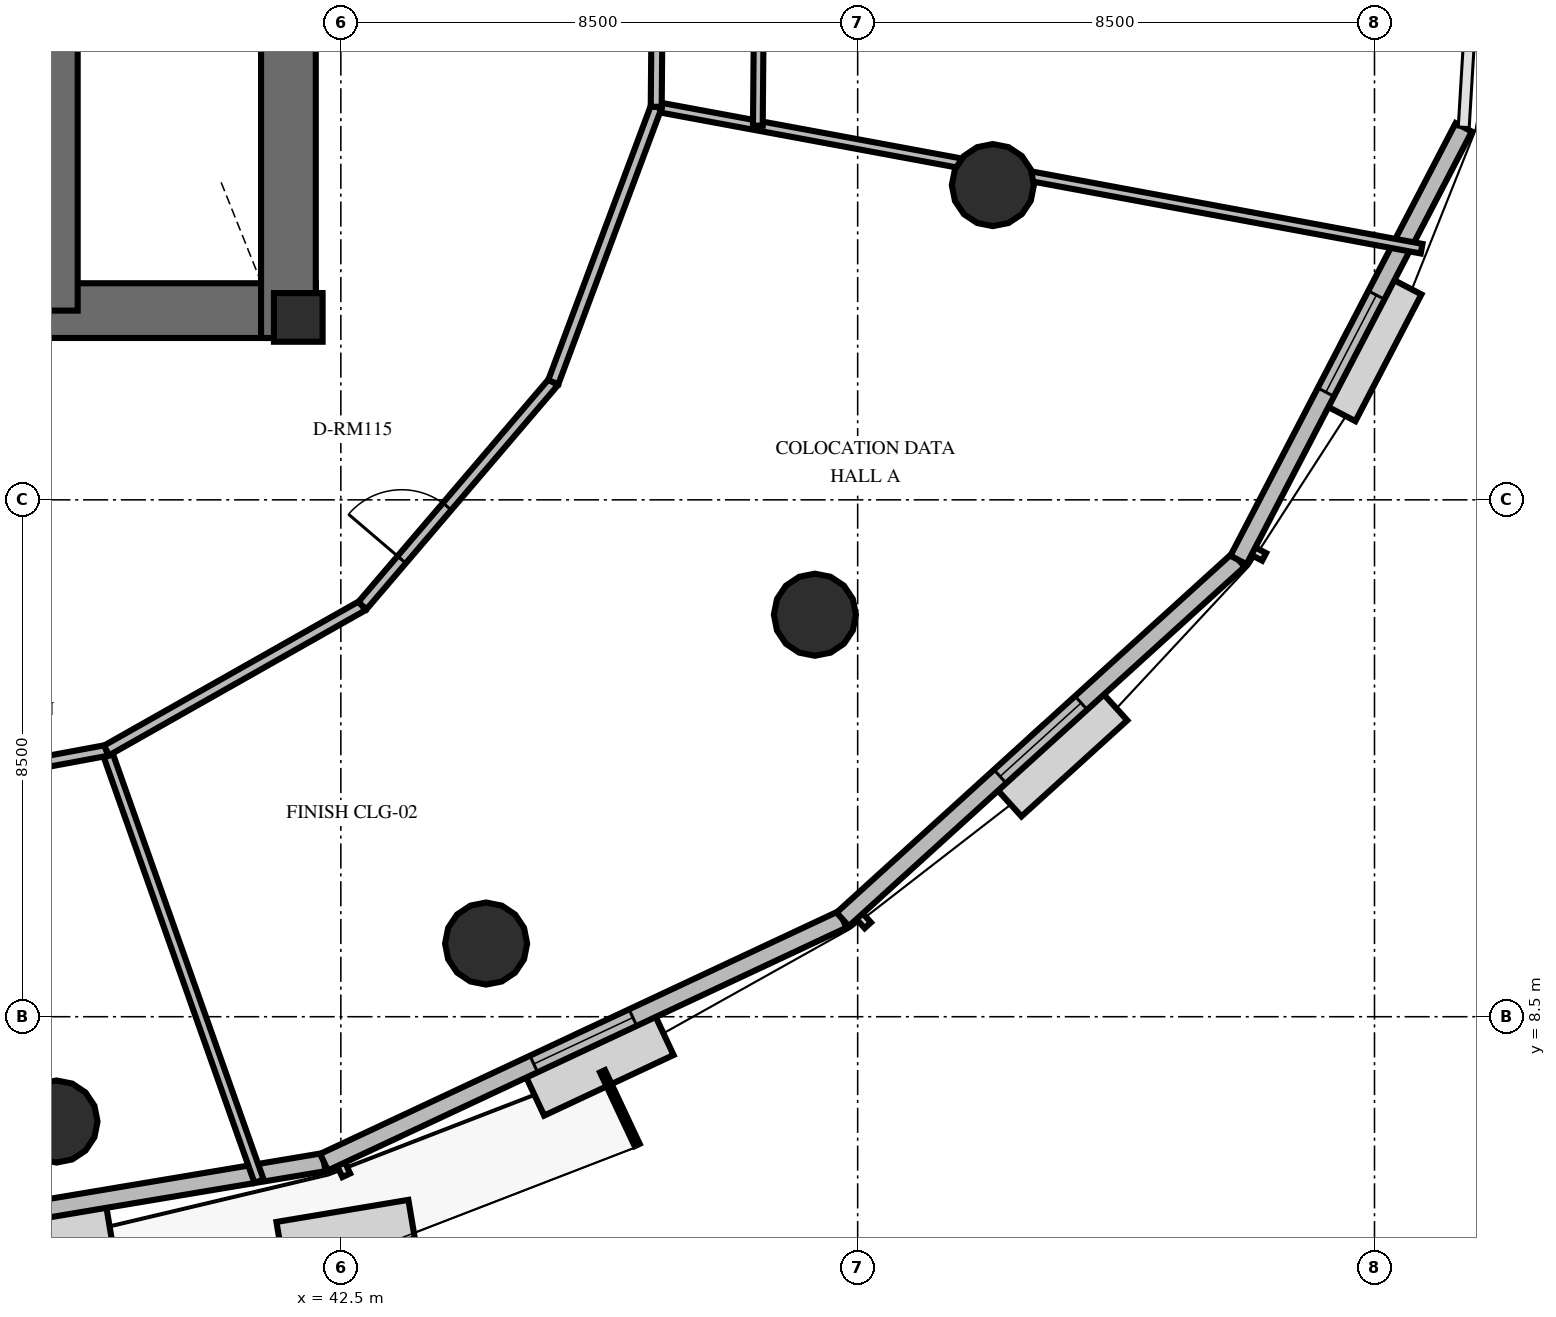
"""IFC4 building model, lengths in metres.
Left out: names, types, materials, properties, quantities, classifications, styles, units other than length and angle.
Written with IfcOpenShell. Run it as: python <this file> out.ifc"""

import sys

from ifc_helpers import new_model, si_unit, direction, frame, frame_2d, origin, origin_2d, place, context, subcontext, project, spatial, rectangle, circle, extrude, element, fill, save


model = new_model("IFC4")
c1 = context("Model", 3, precision=1e-05, world=origin(), true_north=direction((0.0, 1.0)))
c2 = subcontext(c1, "Body", "Model", "MODEL_VIEW")
j1 = project(units=[si_unit("LENGTHUNIT", "METRE"), si_unit("PLANEANGLEUNIT", "RADIAN")], contexts=[c1])
p1 = place(None, origin())
s1 = spatial("IfcSite", under=j1, at=p1, CompositionType="ELEMENT")
p2 = place(p1, origin())
s2 = spatial("IfcBuilding", under=s1, at=p2, CompositionType="ELEMENT")
p3 = place(p2, frame((0.0, 0.0, 72.0)))
s3 = spatial("IfcBuildingStorey", under=s2, at=p3, CompositionType="ELEMENT", Elevation=72.0)
p4 = place(p3, frame((25.922, 20.112, 0.0), z_axis=(0.0, 0.0, 1.0), x_axis=(1.0, 0.0, 0.0)))
e1 = element("IfcWall", 1, at=p4, inside=s3, PredefinedType="SHEAR", context=c2, shape_type="SweptSolid", body=[
    extrude(rectangle(XDim=16.166, YDim=0.9, at=frame_2d((8.083, 0.0))), origin(), (0.0, 0.0, 1.0), 4.2),
])
p5 = place(p3, frame((41.638, 19.662, 0.0), z_axis=(0.0, 0.0, 1.0), x_axis=(0.0, 1.0, 0.0)))
e2 = element("IfcWall", 2, at=p5, inside=s3, PredefinedType="SHEAR", context=c2, shape_type="SweptSolid", body=[
    extrude(rectangle(XDim=10.876, YDim=0.9, at=frame_2d((5.438, 0.0))), origin(), (0.0, 0.0, 1.0), 4.2),
])
p6 = place(p3, frame((37.872, 20.112, 0.0), z_axis=(0.0, 0.0, 1.0), x_axis=(0.0, 1.0, 0.0)))
e3 = element("IfcWall", 3, at=p6, inside=s3, PredefinedType="SHEAR", context=c2, shape_type="SweptSolid", body=[
    extrude(rectangle(XDim=9.976, YDim=0.6, at=frame_2d((4.988, 0.0))), origin(), (0.0, 0.0, 1.0), 4.2),
])
p7 = place(p3, frame((41.8, 20.0, 0.0), z_axis=(0.0, 0.0, 1.0), x_axis=(1.0, 0.0, 0.0)))
e4 = element("IfcColumn", 4, at=p7, inside=s3, PredefinedType="PILASTER", context=c2, shape_type="SweptSolid", body=[
    extrude(rectangle(XDim=0.8, YDim=0.8, at=origin_2d()), origin(), (0.0, 0.0, 1.0), 4.2),
])
for number, where, z_axis, x_axis in (
    (5, (37.824, 6.777, 0.0), (0.0, 0.0, 1.0), (1.0, 0.0, 0.0)),
    (6, (44.889, 9.703, 0.0), (0.0, 0.0, 1.0), (1.0, 0.0, 0.0)),
    (7, (50.297, 15.111, 0.0), (0.0, 0.0, 1.0), (1.0, 0.0, 0.0)),
    (8, (53.223, 22.176, 0.0), (0.0, 0.0, 1.0), (1.0, 0.0, 0.0)),
):
    element("IfcColumn", number, at=place(p3, frame(where, z_axis=z_axis, x_axis=x_axis)), inside=s3, PredefinedType="COLUMN", context=c2, shape_type="SweptSolid", body=[
        extrude(circle(Radius=0.675, at=origin_2d()), origin(), (0.0, 0.0, 1.0), 4.2),
    ])
p8 = place(p3, frame((32.701, 4.514, 0.0), z_axis=(0.0, 0.0, 1.0), x_axis=(0.986285729655, 0.165046840259, 0.0)))
e9 = element("IfcWall", 9, at=p8, inside=s3, PredefinedType="SOLIDWALL", context=c2, shape_type="SweptSolid", body=[
    extrude(rectangle(XDim=9.655, YDim=0.3, at=frame_2d((4.827, 0.0))), origin(), (0.0, 0.0, 1.0), 3.0),
])
p9 = place(p8, frame((0.75, 0.0, 0.0)))
e10 = element("IfcOpeningElement", 10, at=p9, cuts=e9, PredefinedType="OPENING", context=c2, shape_type="SweptSolid", body=[
    extrude(rectangle(XDim=1.05, YDim=2.15, at=frame_2d((0.525, 1.075))), frame((0.0, 0.16, 0.0), z_axis=(0.0, -1.0, 0.0), x_axis=(1.0, 0.0, 0.0)), (0.0, 0.0, 1.0), 0.32),
])
p10 = place(p3, frame((42.223, 6.108, 0.0), z_axis=(0.0, 0.0, 1.0), x_axis=(0.90569382635, 0.423932415499, 0.0)))
e11 = element("IfcWall", 11, at=p10, inside=s3, PredefinedType="SOLIDWALL", context=c2, shape_type="SweptSolid", body=[
    extrude(rectangle(XDim=9.419, YDim=0.3, at=frame_2d((4.709, 0.0))), origin(), (0.0, 0.0, 1.0), 3.0),
])
p11 = place(p10, frame((3.809, 0.0, 0.8)))
e12 = element("IfcOpeningElement", 12, at=p11, cuts=e11, PredefinedType="OPENING", context=c2, shape_type="SweptSolid", body=[
    extrude(rectangle(XDim=1.8, YDim=1.95, at=frame_2d((0.9, 0.975))), frame((0.0, 0.16, 0.0), z_axis=(0.0, -1.0, 0.0), x_axis=(1.0, 0.0, 0.0)), (0.0, 0.0, 1.0), 0.32),
])
p12 = place(p3, frame((50.754, 10.101, 0.0), z_axis=(0.0, 0.0, 1.0), x_axis=(0.74036835803, 0.672201379371, 0.0)))
e13 = element("IfcWall", 13, at=p12, inside=s3, PredefinedType="SOLIDWALL", context=c2, shape_type="SweptSolid", body=[
    extrude(rectangle(XDim=8.793, YDim=0.3, at=frame_2d((4.396, 0.0))), origin(), (0.0, 0.0, 1.0), 3.0),
])
p13 = place(p12, frame((3.496, 0.0, 0.8)))
e14 = element("IfcOpeningElement", 14, at=p13, cuts=e13, PredefinedType="OPENING", context=c2, shape_type="SweptSolid", body=[
    extrude(rectangle(XDim=1.8, YDim=1.95, at=frame_2d((0.9, 0.975))), frame((0.0, 0.16, 0.0), z_axis=(0.0, -1.0, 0.0), x_axis=(1.0, 0.0, 0.0)), (0.0, 0.0, 1.0), 0.32),
])
p14 = place(p3, frame((57.264, 16.011, 0.0), z_axis=(0.0, 0.0, 1.0), x_axis=(0.461738888068, 0.887015895712, 0.0)))
e15 = element("IfcWall", 15, at=p14, inside=s3, PredefinedType="SOLIDWALL", context=c2, shape_type="SweptSolid", body=[
    extrude(rectangle(XDim=8.021, YDim=0.3, at=frame_2d((4.011, 0.0))), origin(), (0.0, 0.0, 1.0), 3.0),
])
p15 = place(p14, frame((3.111, 0.0, 0.8)))
e16 = element("IfcOpeningElement", 16, at=p15, cuts=e15, PredefinedType="OPENING", context=c2, shape_type="SweptSolid", body=[
    extrude(rectangle(XDim=1.8, YDim=1.95, at=frame_2d((0.9, 0.975))), frame((0.0, 0.16, 0.0), z_axis=(0.0, -1.0, 0.0), x_axis=(1.0, 0.0, 0.0)), (0.0, 0.0, 1.0), 0.32),
])
p16 = place(p3, frame((38.646, 12.878, 0.0), z_axis=(0.0, 0.0, 1.0), x_axis=(0.333815866185, -0.942638301515, 0.0)))
e17 = element("IfcWall", 17, at=p16, inside=s3, PredefinedType="PARTITIONING", context=c2, shape_type="SweptSolid", body=[
    extrude(rectangle(XDim=7.514, YDim=0.16, at=frame_2d((3.757, 0.0))), origin(), (0.0, 0.0, 1.0), 3.0),
])
p17 = place(p3, frame((34.365, 12.085, 0.0), z_axis=(0.0, 0.0, 1.0), x_axis=(0.983251507181, 0.182253871363, 0.0)))
e18 = element("IfcWall", 18, at=p17, inside=s3, PredefinedType="PARTITIONING", context=c2, shape_type="SweptSolid", body=[
    extrude(rectangle(XDim=4.355, YDim=0.18, at=frame_2d((2.177, 0.0))), origin(), (0.0, 0.0, 1.0), 3.0),
])
p18 = place(p3, frame((47.687, 23.463, 0.0), z_axis=(0.0, 0.0, 1.0), x_axis=(0.98325518488, -0.182234029223, 0.0)))
e19 = element("IfcWall", 19, at=p18, inside=s3, PredefinedType="PARTITIONING", context=c2, shape_type="SweptSolid", body=[
    extrude(rectangle(XDim=12.802, YDim=0.16, at=frame_2d((6.401, 0.0))), origin(), (0.0, 0.0, 1.0), 3.0),
])
p19 = place(p3, frame((38.646, 12.878, 0.0), z_axis=(0.0, 0.0, 1.0), x_axis=(0.870357726762, 0.492419970621, 0.0)))
e20 = element("IfcWall", 20, at=p19, inside=s3, PredefinedType="PARTITIONING", context=c2, shape_type="SweptSolid", body=[
    extrude(rectangle(XDim=4.834, YDim=0.18, at=frame_2d((2.417, 0.0))), origin(), (0.0, 0.0, 1.0), 3.0),
])
p20 = place(p3, frame((42.854, 15.259, 0.0), z_axis=(0.0, 0.0, 1.0), x_axis=(0.649451176298, 0.760403294052, 0.0)))
e21 = element("IfcWall", 21, at=p20, inside=s3, PredefinedType="PARTITIONING", context=c2, shape_type="SweptSolid", body=[
    extrude(rectangle(XDim=4.834, YDim=0.18, at=frame_2d((2.417, 0.0))), origin(), (0.0, 0.0, 1.0), 3.0),
])
p21 = place(p20, frame((0.996, 0.0, 0.0)))
e22 = element("IfcOpeningElement", 22, at=p21, cuts=e21, PredefinedType="OPENING", context=c2, shape_type="SweptSolid", body=[
    extrude(rectangle(XDim=1.15, YDim=2.15, at=frame_2d((0.575, 1.075))), frame((0.0, 0.1, 0.0), z_axis=(0.0, -1.0, 0.0), x_axis=(1.0, 0.0, 0.0)), (0.0, 0.0, 1.0), 0.2),
])
p22 = place(p3, frame((45.994, 18.935, 0.0), z_axis=(0.0, 0.0, 1.0), x_axis=(0.350215664948, 0.936669092062, 0.0)))
e23 = element("IfcWall", 23, at=p22, inside=s3, PredefinedType="PARTITIONING", context=c2, shape_type="SweptSolid", body=[
    extrude(rectangle(XDim=4.834, YDim=0.18, at=frame_2d((2.417, 0.0))), origin(), (0.0, 0.0, 1.0), 3.0),
])
p23 = place(p3, frame((47.687, 23.463, 0.0), z_axis=(0.0, 0.0, 1.0), x_axis=(0.008686102284, 0.999962275102, 0.0)))
e24 = element("IfcWall", 24, at=p23, inside=s3, PredefinedType="PARTITIONING", context=c2, shape_type="SweptSolid", body=[
    extrude(rectangle(XDim=4.834, YDim=0.18, at=frame_2d((2.417, 0.0))), origin(), (0.0, 0.0, 1.0), 3.0),
])
p24 = place(p23, frame((1.917, 0.0, 0.0)))
e25 = element("IfcOpeningElement", 25, at=p24, cuts=e24, PredefinedType="OPENING", context=c2, shape_type="SweptSolid", body=[
    extrude(rectangle(XDim=1.0, YDim=2.15, at=frame_2d((0.5, 1.075))), frame((0.0, 0.1, 0.0), z_axis=(0.0, -1.0, 0.0), x_axis=(1.0, 0.0, 0.0)), (0.0, 0.0, 1.0), 0.2),
])
p25 = place(p3, frame((49.358, 23.154, 0.0), z_axis=(0.0, 0.0, 1.0), x_axis=(0.008731326175, 0.999961881245, 0.0)))
e26 = element("IfcWall", 26, at=p25, inside=s3, PredefinedType="PARTITIONING", context=c2, shape_type="SweptSolid", body=[
    extrude(rectangle(XDim=5.425, YDim=0.16, at=frame_2d((2.712, 0.0))), origin(), (0.0, 0.0, 1.0), 3.0),
])
p26 = place(p25, frame((2.237, 0.0, 0.0)))
e27 = element("IfcOpeningElement", 27, at=p26, cuts=e26, PredefinedType="OPENING", context=c2, shape_type="SweptSolid", body=[
    extrude(rectangle(XDim=0.95, YDim=2.15, at=frame_2d((0.475, 1.075))), frame((0.0, 0.09, 0.0), z_axis=(0.0, -1.0, 0.0), x_axis=(1.0, 0.0, 0.0)), (0.0, 0.0, 1.0), 0.18),
])
p27 = place(p11, origin())
e28 = element("IfcWindow", 28, at=p27, inside=s3, PartitioningType="SINGLE_PANEL", PredefinedType="WINDOW", context=c2, shape_type="SweptSolid", body=[
    extrude(rectangle(XDim=1.8, YDim=1.95, at=frame_2d((0.9, 0.975))), frame((0.0, 0.03, 0.0), z_axis=(0.0, -1.0, 0.0), x_axis=(1.0, 0.0, 0.0)), (0.0, 0.0, 1.0), 0.06),
])
fill(e12, e28)
p28 = place(p13, origin())
e29 = element("IfcWindow", 29, at=p28, inside=s3, PartitioningType="SINGLE_PANEL", PredefinedType="WINDOW", context=c2, shape_type="SweptSolid", body=[
    extrude(rectangle(XDim=1.8, YDim=1.95, at=frame_2d((0.9, 0.975))), frame((0.0, 0.03, 0.0), z_axis=(0.0, -1.0, 0.0), x_axis=(1.0, 0.0, 0.0)), (0.0, 0.0, 1.0), 0.06),
])
fill(e14, e29)
p29 = place(p15, origin())
e30 = element("IfcWindow", 30, at=p29, inside=s3, PartitioningType="SINGLE_PANEL", PredefinedType="WINDOW", context=c2, shape_type="SweptSolid", body=[
    extrude(rectangle(XDim=1.8, YDim=1.95, at=frame_2d((0.9, 0.975))), frame((0.0, 0.03, 0.0), z_axis=(0.0, -1.0, 0.0), x_axis=(1.0, 0.0, 0.0)), (0.0, 0.0, 1.0), 0.06),
])
fill(e16, e30)
p30 = place(p21, origin())
e31 = element("IfcDoor", 31, at=p30, inside=s3, OperationType="SINGLE_SWING_LEFT", PredefinedType="DOOR", context=c2, shape_type="SweptSolid", body=[
    extrude(rectangle(XDim=1.15, YDim=2.15, at=frame_2d((0.575, 1.075))), frame((0.0, 0.025, 0.0), z_axis=(0.0, -1.0, 0.0), x_axis=(1.0, 0.0, 0.0)), (0.0, 0.0, 1.0), 0.05),
])
fill(e22, e31)
save(model, sys.argv[1])
